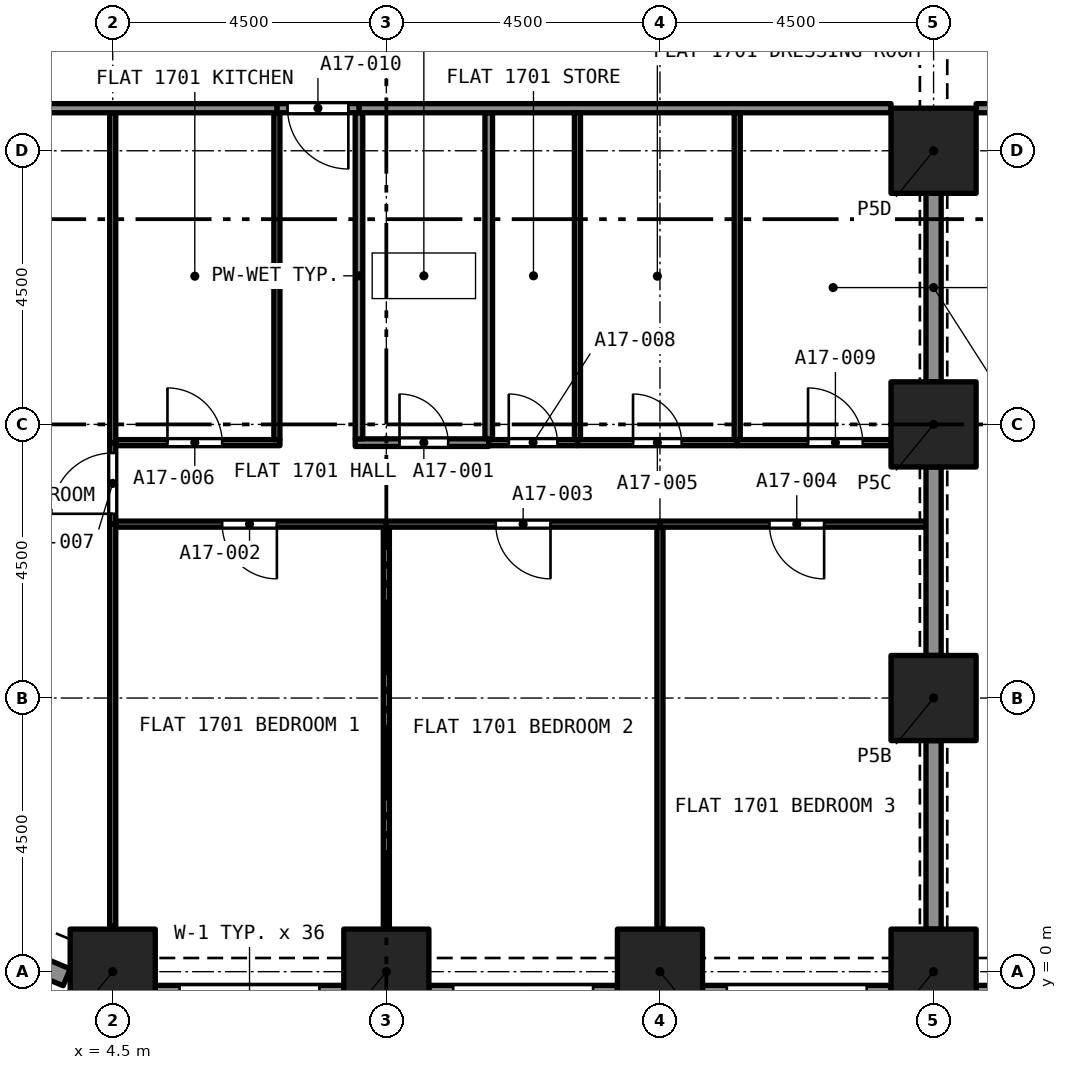
"""IFC4 building model, lengths in metres.
Left out: names, types, materials, properties, quantities, classifications, styles, units other than length and angle.
Written with IfcOpenShell. Run it as: python <this file> out.ifc"""

import sys

from ifc_helpers import new_model, si_unit, direction, frame, frame_2d, origin, origin_2d, place, context, subcontext, project, spatial, rectangle, extrude, element, fill, save


model = new_model("IFC4")
c1 = context("Model", 3, precision=1e-05, world=origin(), true_north=direction((0.0, 1.0)))
c2 = subcontext(c1, "Body", "Model", "MODEL_VIEW")
j1 = project(units=[si_unit("LENGTHUNIT", "METRE"), si_unit("PLANEANGLEUNIT", "RADIAN")], contexts=[c1])
p1 = place(None, origin())
s1 = spatial("IfcSite", under=j1, at=p1, CompositionType="ELEMENT")
p2 = place(p1, origin())
s2 = spatial("IfcBuilding", under=s1, at=p2, CompositionType="ELEMENT")
p3 = place(p2, frame((0.0, 0.0, 65.6)))
s3 = spatial("IfcBuildingStorey", under=s2, at=p3, CompositionType="ELEMENT", Elevation=65.6)
for number, where, z_axis, x_axis in (
    (1, (4.5, 0.0, 0.0), (0.0, 0.0, 1.0), (1.0, 0.0, 0.0)),
    (2, (9.0, 0.0, 0.0), (0.0, 0.0, 1.0), (1.0, 0.0, 0.0)),
    (3, (13.5, 0.0, 0.0), (0.0, 0.0, 1.0), (1.0, 0.0, 0.0)),
    (4, (18.0, 0.0, 0.0), (0.0, 0.0, 1.0), (1.0, 0.0, 0.0)),
    (5, (18.0, 4.5, 0.0), (0.0, 0.0, 1.0), (1.0, 0.0, 0.0)),
    (6, (18.0, 9.0, 0.0), (0.0, 0.0, 1.0), (1.0, 0.0, 0.0)),
    (7, (18.0, 13.5, 0.0), (0.0, 0.0, 1.0), (1.0, 0.0, 0.0)),
):
    element("IfcColumn", number, at=place(p3, frame(where, z_axis=z_axis, x_axis=x_axis)), inside=s3, PredefinedType="COLUMN", context=c2, shape_type="SweptSolid", body=[
        extrude(rectangle(XDim=1.4, YDim=1.4, at=origin_2d()), origin(), (0.0, 0.0, 1.0), 3.2),
    ])
p4 = place(p3, frame((3.743, -0.092, 0.0), z_axis=(0.0, 0.0, 1.0), x_axis=(-0.923857286003, 0.382737135771, 0.0)))
e8 = element("IfcWall", 8, at=p4, inside=s3, PredefinedType="SOLIDWALL", context=c2, shape_type="SweptSolid", body=[
    extrude(rectangle(XDim=1.865, YDim=0.3, at=frame_2d((0.933, 0.0))), origin(), (0.0, 0.0, 1.0), 3.2),
])
p5 = place(p4, frame((0.508, 0.0, 0.45)))
e9 = element("IfcOpeningElement", 9, at=p5, cuts=e8, PredefinedType="OPENING", context=c2, shape_type="SweptSolid", body=[
    extrude(rectangle(XDim=1.1, YDim=1.95, at=frame_2d((0.55, 0.975))), frame((0.0, 0.16, 0.0), z_axis=(0.0, -1.0, 0.0), x_axis=(1.0, 0.0, 0.0)), (0.0, 0.0, 1.0), 0.32),
])
p6 = place(p3, frame((8.3, -0.375, 0.0), z_axis=(0.0, 0.0, 1.0), x_axis=(-1.0, 0.0, 0.0)))
e10 = element("IfcWall", 10, at=p6, inside=s3, PredefinedType="SOLIDWALL", context=c2, shape_type="SweptSolid", body=[
    extrude(rectangle(XDim=3.1, YDim=0.3, at=frame_2d((1.55, 0.0))), origin(), (0.0, 0.0, 1.0), 3.2),
])
p7 = place(p6, frame((0.4, 0.0, 0.45)))
e11 = element("IfcOpeningElement", 11, at=p7, cuts=e10, PredefinedType="OPENING", context=c2, shape_type="SweptSolid", body=[
    extrude(rectangle(XDim=2.3, YDim=1.95, at=frame_2d((1.15, 0.975))), frame((0.0, 0.16, 0.0), z_axis=(0.0, -1.0, 0.0), x_axis=(1.0, 0.0, 0.0)), (0.0, 0.0, 1.0), 0.32),
])
p8 = place(p3, frame((12.8, -0.375, 0.0), z_axis=(0.0, 0.0, 1.0), x_axis=(-1.0, 0.0, 0.0)))
e12 = element("IfcWall", 12, at=p8, inside=s3, PredefinedType="SOLIDWALL", context=c2, shape_type="SweptSolid", body=[
    extrude(rectangle(XDim=3.1, YDim=0.3, at=frame_2d((1.55, 0.0))), origin(), (0.0, 0.0, 1.0), 3.2),
])
p9 = place(p8, frame((0.4, 0.0, 0.45)))
e13 = element("IfcOpeningElement", 13, at=p9, cuts=e12, PredefinedType="OPENING", context=c2, shape_type="SweptSolid", body=[
    extrude(rectangle(XDim=2.3, YDim=1.95, at=frame_2d((1.15, 0.975))), frame((0.0, 0.16, 0.0), z_axis=(0.0, -1.0, 0.0), x_axis=(1.0, 0.0, 0.0)), (0.0, 0.0, 1.0), 0.32),
])
p10 = place(p3, frame((17.3, -0.375, 0.0), z_axis=(0.0, 0.0, 1.0), x_axis=(-1.0, 0.0, 0.0)))
e14 = element("IfcWall", 14, at=p10, inside=s3, PredefinedType="SOLIDWALL", context=c2, shape_type="SweptSolid", body=[
    extrude(rectangle(XDim=3.1, YDim=0.3, at=frame_2d((1.55, 0.0))), origin(), (0.0, 0.0, 1.0), 3.2),
])
p11 = place(p10, frame((0.4, 0.0, 0.45)))
e15 = element("IfcOpeningElement", 15, at=p11, cuts=e14, PredefinedType="OPENING", context=c2, shape_type="SweptSolid", body=[
    extrude(rectangle(XDim=2.3, YDim=1.95, at=frame_2d((1.15, 0.975))), frame((0.0, 0.16, 0.0), z_axis=(0.0, -1.0, 0.0), x_axis=(1.0, 0.0, 0.0)), (0.0, 0.0, 1.0), 0.32),
])
p12 = place(p3, frame((21.8, -0.375, 0.0), z_axis=(0.0, 0.0, 1.0), x_axis=(-1.0, 0.0, 0.0)))
e16 = element("IfcWall", 16, at=p12, inside=s3, PredefinedType="SOLIDWALL", context=c2, shape_type="SweptSolid", body=[
    extrude(rectangle(XDim=3.1, YDim=0.3, at=frame_2d((1.55, 0.0))), origin(), (0.0, 0.0, 1.0), 3.2),
])
p13 = place(p12, frame((0.4, 0.0, 0.45)))
e17 = element("IfcOpeningElement", 17, at=p13, cuts=e16, PredefinedType="OPENING", context=c2, shape_type="SweptSolid", body=[
    extrude(rectangle(XDim=2.3, YDim=1.95, at=frame_2d((1.15, 0.975))), frame((0.0, 0.16, 0.0), z_axis=(0.0, -1.0, 0.0), x_axis=(1.0, 0.0, 0.0)), (0.0, 0.0, 1.0), 0.32),
])
p14 = place(p3, frame((8.488, 8.7, 0.0), z_axis=(0.0, 0.0, 1.0), x_axis=(1.0, 0.0, 0.0)))
e18 = element("IfcWall", 18, at=p14, inside=s3, PredefinedType="PARTITIONING", context=c2, shape_type="SweptSolid", body=[
    extrude(rectangle(XDim=2.196, YDim=0.125, at=frame_2d((1.098, 0.0))), origin(), (0.0, 0.0, 1.0), 2.9),
])
p15 = place(p14, frame((0.729, 0.0, 0.0)))
e19 = element("IfcOpeningElement", 19, at=p15, cuts=e18, PredefinedType="OPENING", context=c2, shape_type="SweptSolid", body=[
    extrude(rectangle(XDim=0.8, YDim=2.1, at=frame_2d((0.4, 1.05))), frame((0.0, 0.073, 0.0), z_axis=(0.0, -1.0, 0.0), x_axis=(1.0, 0.0, 0.0)), (0.0, 0.0, 1.0), 0.145),
])
for number, where, z_axis, x_axis in (
    (20, (8.55, 8.762, 0.0), (0.0, 0.0, 1.0), (0.0, 1.0, 0.0)),
    (21, (10.684, 8.762, 0.0), (0.0, 0.0, 1.0), (0.0, 1.0, 0.0)),
):
    element("IfcWall", number, at=place(p3, frame(where, z_axis=z_axis, x_axis=x_axis)), inside=s3, PredefinedType="PARTITIONING", context=c2, shape_type="SweptSolid", body=[
        extrude(rectangle(XDim=5.363, YDim=0.125, at=frame_2d((2.681, 0.0))), origin(), (0.0, 0.0, 1.0), 2.9),
    ])
p16 = place(p3, frame((8.55, 14.2, 0.0), z_axis=(0.0, 0.0, 1.0), x_axis=(1.0, 0.0, 0.0)))
e22 = element("IfcWall", 22, at=p16, inside=s3, PredefinedType="PARTITIONING", context=c2, shape_type="SweptSolid", body=[
    extrude(rectangle(XDim=8.75, YDim=0.15, at=frame_2d((4.375, 0.0))), origin(), (0.0, 0.0, 1.0), 2.9),
])
p17 = place(p3, frame((9.0, 0.7, 0.0), z_axis=(0.0, 0.0, 1.0), x_axis=(0.0, 1.0, 0.0)))
e23 = element("IfcWall", 23, at=p17, inside=s3, PredefinedType="PARTITIONING", context=c2, shape_type="SweptSolid", body=[
    extrude(rectangle(XDim=6.61, YDim=0.1, at=frame_2d((3.305, 0.0))), origin(), (0.0, 0.0, 1.0), 2.9),
])
p18 = place(p3, frame((9.0, 7.36, 0.0), z_axis=(0.0, 0.0, 1.0), x_axis=(-1.0, 0.0, 0.0)))
e24 = element("IfcWall", 24, at=p18, inside=s3, PredefinedType="PARTITIONING", context=c2, shape_type="SweptSolid", body=[
    extrude(rectangle(XDim=4.45, YDim=0.1, at=frame_2d((2.225, 0.0))), origin(), (0.0, 0.0, 1.0), 2.9),
])
p19 = place(p18, frame((1.8, 0.0, 0.0)))
e25 = element("IfcOpeningElement", 25, at=p19, cuts=e24, PredefinedType="OPENING", context=c2, shape_type="SweptSolid", body=[
    extrude(rectangle(XDim=0.9, YDim=2.1, at=frame_2d((0.45, 1.05))), frame((0.0, 0.06, 0.0), z_axis=(0.0, -1.0, 0.0), x_axis=(1.0, 0.0, 0.0)), (0.0, 0.0, 1.0), 0.12),
])
p20 = place(p3, frame((4.5, 0.758, 0.0), z_axis=(0.0, 0.0, 1.0), x_axis=(0.0, 1.0, 0.0)))
e26 = element("IfcWall", 26, at=p20, inside=s3, PredefinedType="PARTITIONING", context=c2, shape_type="SweptSolid", body=[
    extrude(rectangle(XDim=6.603, YDim=0.1, at=frame_2d((3.301, 0.0))), origin(), (0.0, 0.0, 1.0), 2.9),
])
p21 = place(p3, frame((13.5, 0.7, 0.0), z_axis=(0.0, 0.0, 1.0), x_axis=(0.0, 1.0, 0.0)))
e27 = element("IfcWall", 27, at=p21, inside=s3, PredefinedType="PARTITIONING", context=c2, shape_type="SweptSolid", body=[
    extrude(rectangle(XDim=6.61, YDim=0.1, at=frame_2d((3.305, 0.0))), origin(), (0.0, 0.0, 1.0), 2.9),
])
p22 = place(p3, frame((13.5, 7.36, 0.0), z_axis=(0.0, 0.0, 1.0), x_axis=(-1.0, 0.0, 0.0)))
e28 = element("IfcWall", 28, at=p22, inside=s3, PredefinedType="PARTITIONING", context=c2, shape_type="SweptSolid", body=[
    extrude(rectangle(XDim=4.5, YDim=0.1, at=frame_2d((2.25, 0.0))), origin(), (0.0, 0.0, 1.0), 2.9),
])
p23 = place(p22, frame((1.8, 0.0, 0.0)))
e29 = element("IfcOpeningElement", 29, at=p23, cuts=e28, PredefinedType="OPENING", context=c2, shape_type="SweptSolid", body=[
    extrude(rectangle(XDim=0.9, YDim=2.1, at=frame_2d((0.45, 1.05))), frame((0.0, 0.06, 0.0), z_axis=(0.0, -1.0, 0.0), x_axis=(1.0, 0.0, 0.0)), (0.0, 0.0, 1.0), 0.12),
])
p24 = place(p3, frame((17.875, 7.36, 0.0), z_axis=(0.0, 0.0, 1.0), x_axis=(-1.0, 0.0, 0.0)))
e30 = element("IfcWall", 30, at=p24, inside=s3, PredefinedType="PARTITIONING", context=c2, shape_type="SweptSolid", body=[
    extrude(rectangle(XDim=4.375, YDim=0.1, at=frame_2d((2.188, 0.0))), origin(), (0.0, 0.0, 1.0), 2.9),
])
p25 = place(p24, frame((1.675, 0.0, 0.0)))
e31 = element("IfcOpeningElement", 31, at=p25, cuts=e30, PredefinedType="OPENING", context=c2, shape_type="SweptSolid", body=[
    extrude(rectangle(XDim=0.9, YDim=2.1, at=frame_2d((0.45, 1.05))), frame((0.0, 0.06, 0.0), z_axis=(0.0, -1.0, 0.0), x_axis=(1.0, 0.0, 0.0)), (0.0, 0.0, 1.0), 0.12),
])
for number, where, z_axis, x_axis in (
    (32, (18.0, 5.2, 0.0), (0.0, 0.0, 1.0), (0.0, 1.0, 0.0)),
    (33, (18.0, 0.7, 0.0), (0.0, 0.0, 1.0), (0.0, 1.0, 0.0)),
):
    element("IfcWall", number, at=place(p3, frame(where, z_axis=z_axis, x_axis=x_axis)), inside=s3, PredefinedType="PARTITIONING", context=c2, shape_type="SweptSolid", body=[
        extrude(rectangle(XDim=3.1, YDim=0.25, at=frame_2d((1.55, 0.0))), origin(), (0.0, 0.0, 1.0), 2.38),
    ])
p26 = place(p3, frame((12.143, 8.7, 0.0), z_axis=(0.0, 0.0, 1.0), x_axis=(1.0, 0.0, 0.0)))
e34 = element("IfcWall", 34, at=p26, inside=s3, PredefinedType="PARTITIONING", context=c2, shape_type="SweptSolid", body=[
    extrude(rectangle(XDim=2.628, YDim=0.1, at=frame_2d((1.314, 0.0))), origin(), (0.0, 0.0, 1.0), 2.9),
])
p27 = place(p26, frame((0.914, 0.0, 0.0)))
e35 = element("IfcOpeningElement", 35, at=p27, cuts=e34, PredefinedType="OPENING", context=c2, shape_type="SweptSolid", body=[
    extrude(rectangle(XDim=0.8, YDim=2.1, at=frame_2d((0.4, 1.05))), frame((0.0, 0.06, 0.0), z_axis=(0.0, -1.0, 0.0), x_axis=(1.0, 0.0, 0.0)), (0.0, 0.0, 1.0), 0.12),
])
for number, where, z_axis, x_axis in (
    (36, (12.143, 8.75, 0.0), (0.0, 0.0, 1.0), (0.0, 1.0, 0.0)),
    (37, (14.771, 8.75, 0.0), (0.0, 0.0, 1.0), (0.0, 1.0, 0.0)),
):
    element("IfcWall", number, at=place(p3, frame(where, z_axis=z_axis, x_axis=x_axis)), inside=s3, PredefinedType="PARTITIONING", context=c2, shape_type="SweptSolid", body=[
        extrude(rectangle(XDim=5.375, YDim=0.1, at=frame_2d((2.688, 0.0))), origin(), (0.0, 0.0, 1.0), 2.9),
    ])
p28 = place(p3, frame((4.55, 8.7, 0.0), z_axis=(0.0, 0.0, 1.0), x_axis=(1.0, 0.0, 0.0)))
e38 = element("IfcWall", 38, at=p28, inside=s3, PredefinedType="PARTITIONING", context=c2, shape_type="SweptSolid", body=[
    extrude(rectangle(XDim=2.7, YDim=0.1, at=frame_2d((1.35, 0.0))), origin(), (0.0, 0.0, 1.0), 2.9),
])
p29 = place(p28, frame((0.85, 0.0, 0.0)))
e39 = element("IfcOpeningElement", 39, at=p29, cuts=e38, PredefinedType="OPENING", context=c2, shape_type="SweptSolid", body=[
    extrude(rectangle(XDim=0.9, YDim=2.1, at=frame_2d((0.45, 1.05))), frame((0.0, 0.06, 0.0), z_axis=(0.0, -1.0, 0.0), x_axis=(1.0, 0.0, 0.0)), (0.0, 0.0, 1.0), 0.12),
])
p30 = place(p3, frame((7.2, 8.75, 0.0), z_axis=(0.0, 0.0, 1.0), x_axis=(0.0, 1.0, 0.0)))
e40 = element("IfcWall", 40, at=p30, inside=s3, PredefinedType="PARTITIONING", context=c2, shape_type="SweptSolid", body=[
    extrude(rectangle(XDim=5.375, YDim=0.1, at=frame_2d((2.688, 0.0))), origin(), (0.0, 0.0, 1.0), 2.9),
])
p31 = place(p3, frame((4.5, 7.36, 0.0), z_axis=(0.0, 0.0, 1.0), x_axis=(0.0, 1.0, 0.0)))
e41 = element("IfcWall", 41, at=p31, inside=s3, PredefinedType="PARTITIONING", context=c2, shape_type="SweptSolid", body=[
    extrude(rectangle(XDim=1.34, YDim=0.1, at=frame_2d((0.67, 0.0))), origin(), (0.0, 0.0, 1.0), 2.9),
])
p32 = place(p31, frame((0.17, 0.0, 0.0)))
e42 = element("IfcOpeningElement", 42, at=p32, cuts=e41, PredefinedType="OPENING", context=c2, shape_type="SweptSolid", body=[
    extrude(rectangle(XDim=1.0, YDim=2.1, at=frame_2d((0.5, 1.05))), frame((0.0, 0.06, 0.0), z_axis=(0.0, -1.0, 0.0), x_axis=(1.0, 0.0, 0.0)), (0.0, 0.0, 1.0), 0.12),
])
p33 = place(p3, frame((10.684, 8.7, 0.0), z_axis=(0.0, 0.0, 1.0), x_axis=(1.0, 0.0, 0.0)))
e43 = element("IfcWall", 43, at=p33, inside=s3, PredefinedType="PARTITIONING", context=c2, shape_type="SweptSolid", body=[
    extrude(rectangle(XDim=1.46, YDim=0.1, at=frame_2d((0.73, 0.0))), origin(), (0.0, 0.0, 1.0), 2.9),
])
p34 = place(p33, frame((0.33, 0.0, 0.0)))
e44 = element("IfcOpeningElement", 44, at=p34, cuts=e43, PredefinedType="OPENING", context=c2, shape_type="SweptSolid", body=[
    extrude(rectangle(XDim=0.8, YDim=2.1, at=frame_2d((0.4, 1.05))), frame((0.0, 0.06, 0.0), z_axis=(0.0, -1.0, 0.0), x_axis=(1.0, 0.0, 0.0)), (0.0, 0.0, 1.0), 0.12),
])
p35 = place(p3, frame((14.771, 8.7, 0.0), z_axis=(0.0, 0.0, 1.0), x_axis=(1.0, 0.0, 0.0)))
e45 = element("IfcWall", 45, at=p35, inside=s3, PredefinedType="PARTITIONING", context=c2, shape_type="SweptSolid", body=[
    extrude(rectangle(XDim=2.529, YDim=0.1, at=frame_2d((1.265, 0.0))), origin(), (0.0, 0.0, 1.0), 2.9),
])
p36 = place(p35, frame((1.165, 0.0, 0.0)))
e46 = element("IfcOpeningElement", 46, at=p36, cuts=e45, PredefinedType="OPENING", context=c2, shape_type="SweptSolid", body=[
    extrude(rectangle(XDim=0.9, YDim=2.1, at=frame_2d((0.45, 1.05))), frame((0.0, 0.06, 0.0), z_axis=(0.0, -1.0, 0.0), x_axis=(1.0, 0.0, 0.0)), (0.0, 0.0, 1.0), 0.12),
])
p37 = place(p3, frame((8.55, 14.2, 0.0), z_axis=(0.0, 0.0, 1.0), x_axis=(-1.0, 0.0, 0.0)))
e47 = element("IfcWall", 47, at=p37, inside=s3, PredefinedType="PARTITIONING", context=c2, shape_type="SweptSolid", body=[
    extrude(rectangle(XDim=1.35, YDim=0.15, at=frame_2d((0.675, 0.0))), origin(), (0.0, 0.0, 1.0), 2.9),
])
p38 = place(p37, frame((0.175, 0.0, 0.0)))
e48 = element("IfcOpeningElement", 48, at=p38, cuts=e47, PredefinedType="OPENING", context=c2, shape_type="SweptSolid", body=[
    extrude(rectangle(XDim=1.0, YDim=2.1, at=frame_2d((0.5, 1.05))), frame((0.0, 0.085, 0.0), z_axis=(0.0, -1.0, 0.0), x_axis=(1.0, 0.0, 0.0)), (0.0, 0.0, 1.0), 0.17),
])
p39 = place(p3, frame((4.5, 8.7, 0.0), z_axis=(0.0, 0.0, 1.0), x_axis=(0.0, 1.0, 0.0)))
e49 = element("IfcWall", 49, at=p39, inside=s3, PredefinedType="PARTITIONING", context=c2, shape_type="SweptSolid", body=[
    extrude(rectangle(XDim=5.425, YDim=0.1, at=frame_2d((2.712, 0.0))), origin(), (0.0, 0.0, 1.0), 2.9),
])
p40 = place(p3, frame((0.7, 14.2, 0.0), z_axis=(0.0, 0.0, 1.0), x_axis=(1.0, 0.0, 0.0)))
e50 = element("IfcWall", 50, at=p40, inside=s3, PredefinedType="PARTITIONING", context=c2, shape_type="SweptSolid", body=[
    extrude(rectangle(XDim=6.5, YDim=0.15, at=frame_2d((3.25, 0.0))), origin(), (0.0, 0.0, 1.0), 2.9),
])
p41 = place(p3, frame((18.0, 9.7, 0.0), z_axis=(0.0, 0.0, 1.0), x_axis=(0.0, 1.0, 0.0)))
e51 = element("IfcWall", 51, at=p41, inside=s3, PredefinedType="PARTITIONING", context=c2, shape_type="SweptSolid", body=[
    extrude(rectangle(XDim=3.1, YDim=0.25, at=frame_2d((1.55, 0.0))), origin(), (0.0, 0.0, 1.0), 2.38),
])
p42 = place(p3, frame((22.5, 14.2, 0.0), z_axis=(0.0, 0.0, 1.0), x_axis=(-1.0, 0.0, 0.0)))
e52 = element("IfcWall", 52, at=p42, inside=s3, PredefinedType="PARTITIONING", context=c2, shape_type="SweptSolid", body=[
    extrude(rectangle(XDim=3.8, YDim=0.15, at=frame_2d((1.9, 0.0))), origin(), (0.0, 0.0, 1.0), 2.75),
])
p43 = place(p42, frame((1.75, 0.0, 0.0)))
e53 = element("IfcOpeningElement", 53, at=p43, cuts=e52, PredefinedType="OPENING", context=c2, shape_type="SweptSolid", body=[
    extrude(rectangle(XDim=1.0, YDim=2.1, at=frame_2d((0.5, 1.05))), frame((0.0, 0.085, 0.0), z_axis=(0.0, -1.0, 0.0), x_axis=(1.0, 0.0, 0.0)), (0.0, 0.0, 1.0), 0.17),
])
p44 = place(p15, origin())
e54 = element("IfcDoor", 54, at=p44, inside=s3, OperationType="SINGLE_SWING_RIGHT", PredefinedType="DOOR", context=c2, shape_type="SweptSolid", body=[
    extrude(rectangle(XDim=0.8, YDim=2.1, at=frame_2d((0.4, 1.05))), frame((0.0, 0.025, 0.0), z_axis=(0.0, -1.0, 0.0), x_axis=(1.0, 0.0, 0.0)), (0.0, 0.0, 1.0), 0.05),
])
fill(e19, e54)
p45 = place(p19, origin())
e55 = element("IfcDoor", 55, at=p45, inside=s3, OperationType="SINGLE_SWING_RIGHT", PredefinedType="DOOR", context=c2, shape_type="SweptSolid", body=[
    extrude(rectangle(XDim=0.9, YDim=2.1, at=frame_2d((0.45, 1.05))), frame((0.0, 0.025, 0.0), z_axis=(0.0, -1.0, 0.0), x_axis=(1.0, 0.0, 0.0)), (0.0, 0.0, 1.0), 0.05),
])
fill(e25, e55)
p46 = place(p23, origin())
e56 = element("IfcDoor", 56, at=p46, inside=s3, OperationType="SINGLE_SWING_LEFT", PredefinedType="DOOR", context=c2, shape_type="SweptSolid", body=[
    extrude(rectangle(XDim=0.9, YDim=2.1, at=frame_2d((0.45, 1.05))), frame((0.0, 0.025, 0.0), z_axis=(0.0, -1.0, 0.0), x_axis=(1.0, 0.0, 0.0)), (0.0, 0.0, 1.0), 0.05),
])
fill(e29, e56)
p47 = place(p25, origin())
e57 = element("IfcDoor", 57, at=p47, inside=s3, OperationType="SINGLE_SWING_LEFT", PredefinedType="DOOR", context=c2, shape_type="SweptSolid", body=[
    extrude(rectangle(XDim=0.9, YDim=2.1, at=frame_2d((0.45, 1.05))), frame((0.0, 0.025, 0.0), z_axis=(0.0, -1.0, 0.0), x_axis=(1.0, 0.0, 0.0)), (0.0, 0.0, 1.0), 0.05),
])
fill(e31, e57)
p48 = place(p27, origin())
e58 = element("IfcDoor", 58, at=p48, inside=s3, OperationType="SINGLE_SWING_LEFT", PredefinedType="DOOR", context=c2, shape_type="SweptSolid", body=[
    extrude(rectangle(XDim=0.8, YDim=2.1, at=frame_2d((0.4, 1.05))), frame((0.0, 0.025, 0.0), z_axis=(0.0, -1.0, 0.0), x_axis=(1.0, 0.0, 0.0)), (0.0, 0.0, 1.0), 0.05),
])
fill(e35, e58)
p49 = place(p29, origin())
e59 = element("IfcDoor", 59, at=p49, inside=s3, OperationType="SINGLE_SWING_LEFT", PredefinedType="DOOR", context=c2, shape_type="SweptSolid", body=[
    extrude(rectangle(XDim=0.9, YDim=2.1, at=frame_2d((0.45, 1.05))), frame((0.0, 0.025, 0.0), z_axis=(0.0, -1.0, 0.0), x_axis=(1.0, 0.0, 0.0)), (0.0, 0.0, 1.0), 0.05),
])
fill(e39, e59)
p50 = place(p32, origin())
e60 = element("IfcDoor", 60, at=p50, inside=s3, OperationType="SINGLE_SWING_LEFT", PredefinedType="DOOR", context=c2, shape_type="SweptSolid", body=[
    extrude(rectangle(XDim=1.0, YDim=2.1, at=frame_2d((0.5, 1.05))), frame((0.0, 0.025, 0.0), z_axis=(0.0, -1.0, 0.0), x_axis=(1.0, 0.0, 0.0)), (0.0, 0.0, 1.0), 0.05),
])
fill(e42, e60)
p51 = place(p34, origin())
e61 = element("IfcDoor", 61, at=p51, inside=s3, OperationType="SINGLE_SWING_LEFT", PredefinedType="DOOR", context=c2, shape_type="SweptSolid", body=[
    extrude(rectangle(XDim=0.8, YDim=2.1, at=frame_2d((0.4, 1.05))), frame((0.0, 0.025, 0.0), z_axis=(0.0, -1.0, 0.0), x_axis=(1.0, 0.0, 0.0)), (0.0, 0.0, 1.0), 0.05),
])
fill(e44, e61)
p52 = place(p36, origin())
e62 = element("IfcDoor", 62, at=p52, inside=s3, OperationType="SINGLE_SWING_RIGHT", PredefinedType="DOOR", context=c2, shape_type="SweptSolid", body=[
    extrude(rectangle(XDim=0.9, YDim=2.1, at=frame_2d((0.45, 1.05))), frame((0.0, 0.025, 0.0), z_axis=(0.0, -1.0, 0.0), x_axis=(1.0, 0.0, 0.0)), (0.0, 0.0, 1.0), 0.05),
])
fill(e46, e62)
p53 = place(p38, origin())
e63 = element("IfcDoor", 63, at=p53, inside=s3, OperationType="SINGLE_SWING_RIGHT", PredefinedType="DOOR", context=c2, shape_type="SweptSolid", body=[
    extrude(rectangle(XDim=1.0, YDim=2.1, at=frame_2d((0.5, 1.05))), frame((0.0, 0.025, 0.0), z_axis=(0.0, -1.0, 0.0), x_axis=(1.0, 0.0, 0.0)), (0.0, 0.0, 1.0), 0.05),
])
fill(e48, e63)
save(model, sys.argv[1])
